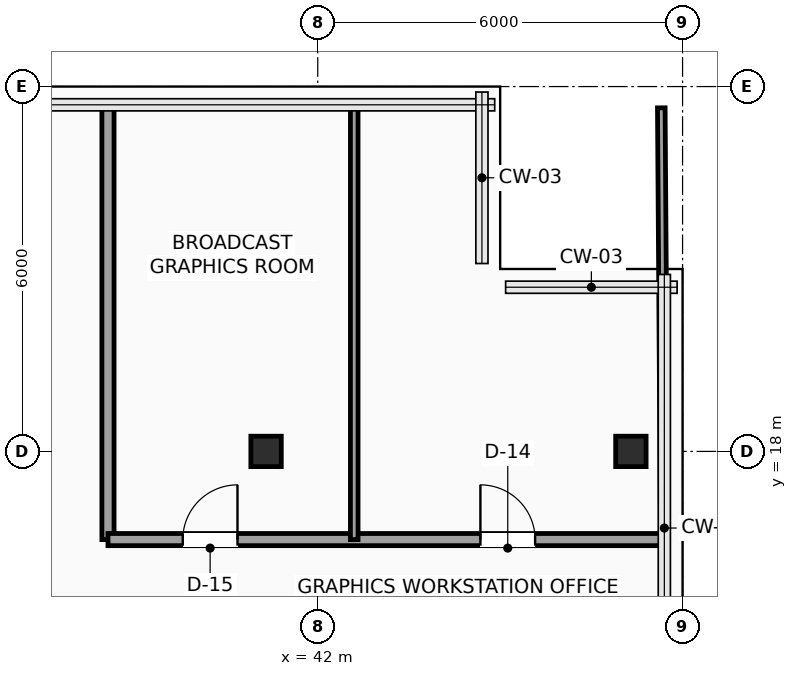
"""IFC4 building model, lengths in metres.
Left out: names, types, materials, properties, quantities, classifications, styles, units other than length and angle.
Written with IfcOpenShell. Run it as: python <this file> out.ifc"""

import sys

from ifc_helpers import new_model, si_unit, direction, frame, frame_2d, origin, origin_2d, place, context, subcontext, project, spatial, rectangle, hollow_rectangle, extrude, element, fill, save


model = new_model("IFC4")
c1 = context("Model", 3, precision=1e-05, world=origin(), true_north=direction((0.0, 1.0)))
c2 = subcontext(c1, "Body", "Model", "MODEL_VIEW")
j1 = project(units=[si_unit("LENGTHUNIT", "METRE"), si_unit("PLANEANGLEUNIT", "RADIAN")], contexts=[c1])
p1 = place(None, origin())
s1 = spatial("IfcSite", under=j1, at=p1, CompositionType="ELEMENT")
p2 = place(p1, origin())
s2 = spatial("IfcBuilding", under=s1, at=p2, CompositionType="ELEMENT")
p3 = place(p2, frame((0.0, 0.0, 153.15)))
s3 = spatial("IfcBuildingStorey", under=s2, at=p3, CompositionType="ELEMENT", Elevation=153.15)
for number, where, z_axis, x_axis in (
    (1, (41.15, 18.0, 0.0), (0.0, 0.0, 1.0), (1.0, 0.0, 0.0)),
    (2, (47.15, 18.0, 0.0), (0.0, 0.0, 1.0), (1.0, 0.0, 0.0)),
):
    element("IfcColumn", number, at=place(p3, frame(where, z_axis=z_axis, x_axis=x_axis)), inside=s3, PredefinedType="COLUMN", context=c2, shape_type="SweptSolid", body=[
        extrude(hollow_rectangle(XDim=0.5, YDim=0.5, WallThickness=0.025, InnerFilletRadius=0.025, OuterFilletRadius=0.04, at=origin_2d()), origin(), (0.0, 0.0, 1.0), 3.75),
    ])
p4 = place(p3, frame((38.55, 23.7, 0.0), z_axis=(0.0, 0.0, 1.0), x_axis=(0.0, -1.0, 0.0)))
e3 = element("IfcWall", 3, at=p4, inside=s3, PredefinedType="SOLIDWALL", context=c2, shape_type="SweptSolid", body=[
    extrude(rectangle(XDim=7.15, YDim=0.2, at=frame_2d((3.575, 0.0))), origin(), (0.0, 0.0, 1.0), 3.525),
])
p5 = place(p3, frame((38.55, 16.55, 0.0), z_axis=(0.0, 0.0, 1.0), x_axis=(1.0, 0.0, 0.0)))
e4 = element("IfcWall", 4, at=p5, inside=s3, PredefinedType="SOLIDWALL", context=c2, shape_type="SweptSolid", body=[
    extrude(rectangle(XDim=9.15, YDim=0.2, at=frame_2d((4.575, 0.0))), origin(), (0.0, 0.0, 1.0), 3.525),
])
p6 = place(p5, frame((1.23, 0.0, 0.0)))
e5 = element("IfcOpeningElement", 5, at=p6, cuts=e4, PredefinedType="OPENING", context=c2, shape_type="SweptSolid", body=[
    extrude(rectangle(XDim=0.9, YDim=2.1, at=frame_2d((0.45, 1.05))), frame((0.0, 0.11, 0.0), z_axis=(0.0, -1.0, 0.0), x_axis=(1.0, 0.0, 0.0)), (0.0, 0.0, 1.0), 0.22),
])
p7 = place(p5, frame((6.125, 0.0, 0.0)))
e6 = element("IfcOpeningElement", 6, at=p7, cuts=e4, PredefinedType="OPENING", context=c2, shape_type="SweptSolid", body=[
    extrude(rectangle(XDim=0.9, YDim=2.1, at=frame_2d((0.45, 1.05))), frame((0.0, 0.11, 0.0), z_axis=(0.0, -1.0, 0.0), x_axis=(1.0, 0.0, 0.0)), (0.0, 0.0, 1.0), 0.22),
])
p8 = place(p3, frame((42.6, 16.55, 0.0), z_axis=(0.0, 0.0, 1.0), x_axis=(0.0, 1.0, 0.0)))
e7 = element("IfcWall", 7, at=p8, inside=s3, PredefinedType="PARTITIONING", context=c2, shape_type="SweptSolid", body=[
    extrude(rectangle(XDim=7.15, YDim=0.125, at=frame_2d((3.575, 0.0))), origin(), (0.0, 0.0, 1.0), 3.525),
])
p9 = place(p3, frame((47.7, 16.55, 0.0), z_axis=(0.0, 0.0, 1.0), x_axis=(-0.007049101019, 0.999975154779, 0.0)))
e8 = element("IfcWall", 8, at=p9, inside=s3, PredefinedType="PARTITIONING", context=c2, shape_type="SweptSolid", body=[
    extrude(rectangle(XDim=7.1, YDim=0.125, at=frame_2d((3.55, 0.0))), origin(), (0.0, 0.0, 1.0), 3.525),
])
p10 = place(p6, origin())
e9 = element("IfcDoor", 9, at=p10, inside=s3, OperationType="SINGLE_SWING_RIGHT", PredefinedType="DOOR", context=c2, shape_type="SweptSolid", body=[
    extrude(rectangle(XDim=0.9, YDim=2.1, at=frame_2d((0.45, 1.05))), frame((0.0, 0.025, 0.0), z_axis=(0.0, -1.0, 0.0), x_axis=(1.0, 0.0, 0.0)), (0.0, 0.0, 1.0), 0.05),
])
fill(e5, e9)
p11 = place(p7, origin())
e10 = element("IfcDoor", 10, at=p11, inside=s3, OperationType="SINGLE_SWING_LEFT", PredefinedType="DOOR", context=c2, shape_type="SweptSolid", body=[
    extrude(rectangle(XDim=0.9, YDim=2.1, at=frame_2d((0.45, 1.05))), frame((0.0, 0.025, 0.0), z_axis=(0.0, -1.0, 0.0), x_axis=(1.0, 0.0, 0.0)), (0.0, 0.0, 1.0), 0.05),
])
fill(e6, e10)
save(model, sys.argv[1])
